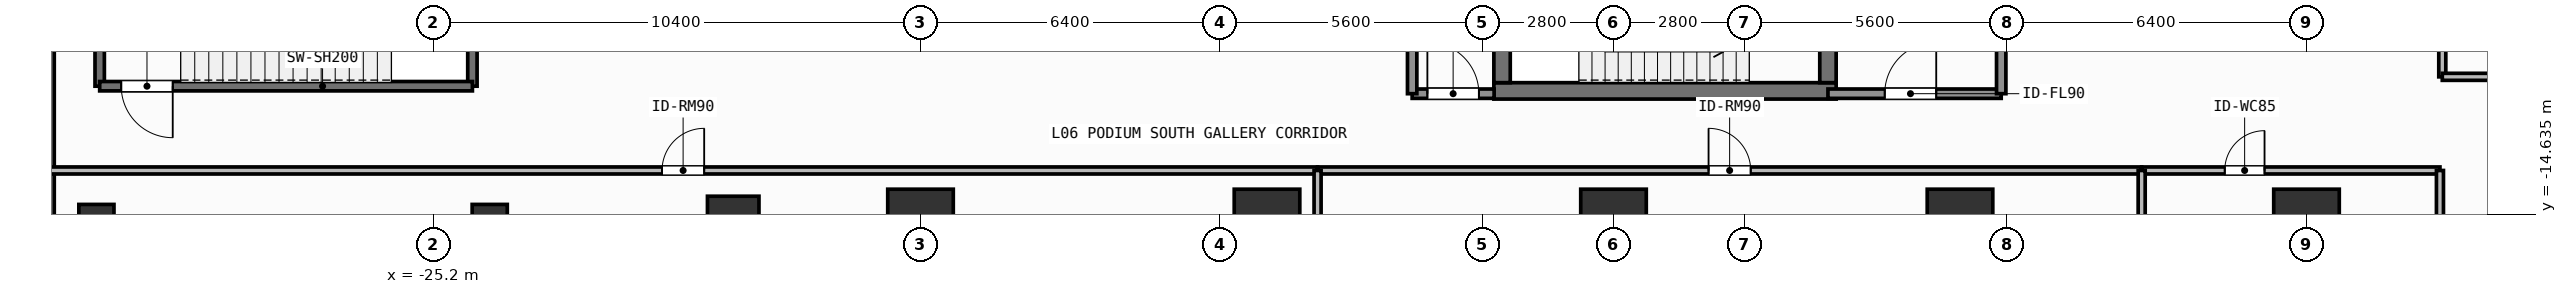
"""IFC4 building model, lengths in metres.
Left out: names, types, materials, properties, quantities, classifications, styles, units other than length and angle.
Written with IfcOpenShell. Run it as: python <this file> out.ifc"""

import sys

from ifc_helpers import new_model, si_unit, direction, frame, frame_2d, origin, origin_2d, place, context, subcontext, project, spatial, rectangle, extrude, element, fill, save


model = new_model("IFC4")
c1 = context("Model", 3, precision=1e-05, world=origin(), true_north=direction((0.0, 1.0)))
c2 = subcontext(c1, "Body", "Model", "MODEL_VIEW")
j1 = project(units=[si_unit("LENGTHUNIT", "METRE"), si_unit("PLANEANGLEUNIT", "RADIAN")], contexts=[c1])
p1 = place(None, origin())
s1 = spatial("IfcSite", under=j1, at=p1, CompositionType="ELEMENT")
p2 = place(p1, origin())
s2 = spatial("IfcBuilding", under=s1, at=p2, CompositionType="ELEMENT")
p3 = place(p2, frame((0.0, 0.0, 21.6)))
s3 = spatial("IfcBuildingStorey", under=s2, at=p3, CompositionType="ELEMENT", Elevation=21.6)
p4 = place(p3, frame((-2.555, -12.0, 0.0), z_axis=(0.0, 0.0, 1.0), x_axis=(1.0, 0.0, 0.0)))
e1 = element("IfcWall", 1, at=p4, inside=s3, PredefinedType="SHEAR", context=c2, shape_type="SweptSolid", body=[
    extrude(rectangle(XDim=7.31, YDim=0.35, at=frame_2d((3.655, 0.0))), origin(), (0.0, 0.0, 1.0), 4.8),
])
p5 = place(p3, frame((-2.38, -11.825, 0.0), z_axis=(0.0, 0.0, 1.0), x_axis=(0.0, 1.0, 0.0)))
e2 = element("IfcWall", 2, at=p5, inside=s3, PredefinedType="SHEAR", context=c2, shape_type="SweptSolid", body=[
    extrude(rectangle(XDim=2.925, YDim=0.35, at=frame_2d((1.462, 0.0))), origin(), (0.0, 0.0, 1.0), 4.8),
])
p6 = place(p3, frame((4.58, -8.9, 0.0), z_axis=(0.0, 0.0, 1.0), x_axis=(0.0, -1.0, 0.0)))
e3 = element("IfcWall", 3, at=p6, inside=s3, PredefinedType="SHEAR", context=c2, shape_type="SweptSolid", body=[
    extrude(rectangle(XDim=2.925, YDim=0.35, at=frame_2d((1.462, 0.0))), origin(), (0.0, 0.0, 1.0), 4.8),
])
p7 = place(p6, frame((0.913, 0.0, 0.0)))
e4 = element("IfcOpeningElement", 4, at=p7, cuts=e3, PredefinedType="OPENING", context=c2, shape_type="SweptSolid", body=[
    extrude(rectangle(XDim=1.1, YDim=2.15, at=frame_2d((0.55, 1.075))), frame((0.0, 0.185, 0.0), z_axis=(0.0, -1.0, 0.0), x_axis=(1.0, 0.0, 0.0)), (0.0, 0.0, 1.0), 0.37),
])
for number, where, z_axis, x_axis in (
    (5, (-14.8, -14.8, 0.0), (0.0, 0.0, 1.0), (1.0, 0.0, 0.0)),
    (6, (-7.4, -14.8, 0.0), (0.0, 0.0, 1.0), (1.0, 0.0, 0.0)),
    (7, (0.0, -14.8, 0.0), (0.0, 0.0, 1.0), (1.0, 0.0, 0.0)),
    (8, (7.4, -14.8, 0.0), (0.0, 0.0, 1.0), (1.0, 0.0, 0.0)),
    (9, (14.8, -14.8, 0.0), (0.0, 0.0, 1.0), (1.0, 0.0, 0.0)),
):
    element("IfcColumn", number, at=place(p3, frame(where, z_axis=z_axis, x_axis=x_axis)), inside=s3, PredefinedType="COLUMN", context=c2, shape_type="SweptSolid", body=[
        extrude(rectangle(XDim=1.4, YDim=1.4, at=origin_2d()), origin(), (0.0, 0.0, 1.0), 4.8),
    ])
p8 = place(p3, frame((-18.8, -14.8, 0.0), z_axis=(0.0, 0.0, 1.0), x_axis=(1.0, 0.0, 0.0)))
e10 = element("IfcColumn", 10, at=p8, inside=s3, PredefinedType="COLUMN", context=c2, shape_type="SweptSolid", body=[
    extrude(rectangle(XDim=1.1, YDim=1.1, at=origin_2d()), origin(), (0.0, 0.0, 1.0), 4.8),
])
for number, where, z_axis, x_axis in (
    (11, (-32.4, -14.8, 0.0), (0.0, 0.0, 1.0), (1.0, 0.0, 0.0)),
    (12, (-24.0, -14.8, 0.0), (0.0, 0.0, 1.0), (1.0, 0.0, 0.0)),
):
    element("IfcColumn", number, at=place(p3, frame(where, z_axis=z_axis, x_axis=x_axis)), inside=s3, PredefinedType="COLUMN", context=c2, shape_type="SweptSolid", body=[
        extrude(rectangle(XDim=0.75, YDim=0.75, at=origin_2d()), origin(), (0.0, 0.0, 1.0), 4.8),
    ])
p9 = place(p3, frame((-33.45, -20.5, 0.0), z_axis=(0.0, 0.0, 1.0), x_axis=(0.0, 1.0, 0.0)))
e13 = element("IfcWall", 13, at=p9, inside=s3, PredefinedType="SOLIDWALL", context=c2, shape_type="SweptSolid", body=[
    extrude(rectangle(XDim=14.09, YDim=0.3, at=frame_2d((7.045, 0.0))), origin(), (0.0, 0.0, 1.0), 4.48),
])
for number, where, z_axis, x_axis in (
    (14, (-32.33, -11.9, 0.0), (0.0, 0.0, 1.0), (0.0, 1.0, 0.0)),
    (15, (-24.37, -8.48, 0.0), (0.0, 0.0, 1.0), (0.0, -1.0, 0.0)),
):
    element("IfcWall", number, at=place(p3, frame(where, z_axis=z_axis, x_axis=x_axis)), inside=s3, PredefinedType="SHEAR", context=c2, shape_type="SweptSolid", body=[
        extrude(rectangle(XDim=3.42, YDim=0.2, at=frame_2d((1.71, 0.0))), origin(), (0.0, 0.0, 1.0), 4.48),
    ])
p10 = place(p3, frame((-24.37, -11.9, 0.0), z_axis=(0.0, 0.0, 1.0), x_axis=(-1.0, 0.0, 0.0)))
e16 = element("IfcWall", 16, at=p10, inside=s3, PredefinedType="SHEAR", context=c2, shape_type="SweptSolid", body=[
    extrude(rectangle(XDim=7.96, YDim=0.2, at=frame_2d((3.98, 0.0))), origin(), (0.0, 0.0, 1.0), 4.48),
])
p11 = place(p10, frame((6.4, 0.0, 0.0)))
e17 = element("IfcOpeningElement", 17, at=p11, cuts=e16, PredefinedType="OPENING", context=c2, shape_type="SweptSolid", body=[
    extrude(rectangle(XDim=1.1, YDim=2.15, at=frame_2d((0.55, 1.075))), frame((0.0, 0.11, 0.0), z_axis=(0.0, -1.0, 0.0), x_axis=(1.0, 0.0, 0.0)), (0.0, 0.0, 1.0), 0.22),
])
p12 = place(p3, frame((4.58, -12.06, 0.0), z_axis=(0.0, 0.0, 1.0), x_axis=(1.0, 0.0, 0.0)))
e18 = element("IfcWall", 18, at=p12, inside=s3, PredefinedType="SOLIDWALL", context=c2, shape_type="SweptSolid", body=[
    extrude(rectangle(XDim=3.7, YDim=0.2, at=frame_2d((1.85, 0.0))), origin(), (0.0, 0.0, 1.0), 4.48),
])
p13 = place(p12, frame((1.212, 0.0, 0.0)))
e19 = element("IfcOpeningElement", 19, at=p13, cuts=e18, PredefinedType="OPENING", context=c2, shape_type="SweptSolid", body=[
    extrude(rectangle(XDim=1.1, YDim=2.15, at=frame_2d((0.55, 1.075))), frame((0.0, 0.11, 0.0), z_axis=(0.0, -1.0, 0.0), x_axis=(1.0, 0.0, 0.0)), (0.0, 0.0, 1.0), 0.22),
])
p14 = place(p3, frame((-4.3, -12.06, 0.0), z_axis=(0.0, 0.0, 1.0), x_axis=(1.0, 0.0, 0.0)))
e20 = element("IfcWall", 20, at=p14, inside=s3, PredefinedType="SOLIDWALL", context=c2, shape_type="SweptSolid", body=[
    extrude(rectangle(XDim=1.75, YDim=0.2, at=frame_2d((0.875, 0.0))), origin(), (0.0, 0.0, 1.0), 4.48),
])
p15 = place(p14, frame((0.325, 0.0, 0.0)))
e21 = element("IfcOpeningElement", 21, at=p15, cuts=e20, PredefinedType="OPENING", context=c2, shape_type="SweptSolid", body=[
    extrude(rectangle(XDim=1.1, YDim=2.15, at=frame_2d((0.55, 1.075))), frame((0.0, 0.11, 0.0), z_axis=(0.0, -1.0, 0.0), x_axis=(1.0, 0.0, 0.0)), (0.0, 0.0, 1.0), 0.22),
])
p16 = place(p3, frame((17.7, -11.7, 0.0), z_axis=(0.0, 0.0, 1.0), x_axis=(0.0, 1.0, 0.0)))
e22 = element("IfcWall", 22, at=p16, inside=s3, PredefinedType="PARTITIONING", context=c2, shape_type="SweptSolid", body=[
    extrude(rectangle(XDim=19.62, YDim=0.15, at=frame_2d((9.81, 0.0))), origin(), (0.0, 0.0, 1.0), 4.48),
])
p17 = place(p16, frame((8.921, 0.0, 0.0)))
e23 = element("IfcOpeningElement", 23, at=p17, cuts=e22, PredefinedType="OPENING", context=c2, shape_type="SweptSolid", body=[
    extrude(rectangle(XDim=1.6, YDim=2.3, at=frame_2d((0.8, 1.15))), frame((0.0, 0.085, 0.0), z_axis=(0.0, -1.0, 0.0), x_axis=(1.0, 0.0, 0.0)), (0.0, 0.0, 1.0), 0.17),
])
p18 = place(p3, frame((-33.42, -13.7, 0.0), z_axis=(0.0, 0.0, 1.0), x_axis=(1.0, 0.0, 0.0)))
e24 = element("IfcWall", 24, at=p18, inside=s3, PredefinedType="PARTITIONING", context=c2, shape_type="SweptSolid", body=[
    extrude(rectangle(XDim=27.1, YDim=0.15, at=frame_2d((13.55, 0.0))), origin(), (0.0, 0.0, 1.0), 4.48),
])
p19 = place(p18, frame((13.1, 0.0, 0.0)))
e25 = element("IfcOpeningElement", 25, at=p19, cuts=e24, PredefinedType="OPENING", context=c2, shape_type="SweptSolid", body=[
    extrude(rectangle(XDim=0.9, YDim=2.1, at=frame_2d((0.45, 1.05))), frame((0.0, 0.085, 0.0), z_axis=(0.0, -1.0, 0.0), x_axis=(1.0, 0.0, 0.0)), (0.0, 0.0, 1.0), 0.17),
])
p20 = place(p3, frame((-6.32, -13.7, 0.0), z_axis=(0.0, 0.0, 1.0), x_axis=(1.0, 0.0, 0.0)))
e26 = element("IfcWall", 26, at=p20, inside=s3, PredefinedType="PARTITIONING", context=c2, shape_type="SweptSolid", body=[
    extrude(rectangle(XDim=17.6, YDim=0.15, at=frame_2d((8.8, 0.0))), origin(), (0.0, 0.0, 1.0), 4.48),
])
p21 = place(p20, frame((8.35, 0.0, 0.0)))
e27 = element("IfcOpeningElement", 27, at=p21, cuts=e26, PredefinedType="OPENING", context=c2, shape_type="SweptSolid", body=[
    extrude(rectangle(XDim=0.9, YDim=2.1, at=frame_2d((0.45, 1.05))), frame((0.0, 0.085, 0.0), z_axis=(0.0, -1.0, 0.0), x_axis=(1.0, 0.0, 0.0)), (0.0, 0.0, 1.0), 0.17),
])
p22 = place(p3, frame((11.28, -13.7, 0.0), z_axis=(0.0, 0.0, 1.0), x_axis=(1.0, 0.0, 0.0)))
e28 = element("IfcWall", 28, at=p22, inside=s3, PredefinedType="PARTITIONING", context=c2, shape_type="SweptSolid", body=[
    extrude(rectangle(XDim=6.37, YDim=0.15, at=frame_2d((3.185, 0.0))), origin(), (0.0, 0.0, 1.0), 4.48),
])
p23 = place(p22, frame((1.774, 0.0, 0.0)))
e29 = element("IfcOpeningElement", 29, at=p23, cuts=e28, PredefinedType="OPENING", context=c2, shape_type="SweptSolid", body=[
    extrude(rectangle(XDim=0.85, YDim=2.1, at=frame_2d((0.425, 1.05))), frame((0.0, 0.085, 0.0), z_axis=(0.0, -1.0, 0.0), x_axis=(1.0, 0.0, 0.0)), (0.0, 0.0, 1.0), 0.17),
])
for number, where, z_axis, x_axis in (
    (30, (8.28, -12.06, 0.0), (0.0, 0.0, 1.0), (0.0, 1.0, 0.0)),
    (31, (-4.3, -12.06, 0.0), (0.0, 0.0, 1.0), (0.0, 1.0, 0.0)),
):
    element("IfcWall", number, at=place(p3, frame(where, z_axis=z_axis, x_axis=x_axis)), inside=s3, PredefinedType="SOLIDWALL", context=c2, shape_type="SweptSolid", body=[
        extrude(rectangle(XDim=3.11, YDim=0.2, at=frame_2d((1.555, 0.0))), origin(), (0.0, 0.0, 1.0), 4.48),
    ])
p24 = place(p3, frame((17.7, -11.7, 0.0), z_axis=(0.0, 0.0, 1.0), x_axis=(1.0, 0.0, 0.0)))
e32 = element("IfcWall", 32, at=p24, inside=s3, PredefinedType="PARTITIONING", context=c2, shape_type="SweptSolid", body=[
    extrude(rectangle(XDim=15.72, YDim=0.15, at=frame_2d((7.86, 0.0))), origin(), (0.0, 0.0, 1.0), 4.48),
])
p25 = place(p3, frame((-6.32, -24.92, 0.0), z_axis=(0.0, 0.0, 1.0), x_axis=(0.0, 1.0, 0.0)))
e33 = element("IfcWall", 33, at=p25, inside=s3, PredefinedType="PARTITIONING", context=c2, shape_type="SweptSolid", body=[
    extrude(rectangle(XDim=11.22, YDim=0.15, at=frame_2d((5.61, 0.0))), origin(), (0.0, 0.0, 1.0), 4.48),
])
p26 = place(p3, frame((11.28, -24.92, 0.0), z_axis=(0.0, 0.0, 1.0), x_axis=(0.0, 1.0, 0.0)))
e34 = element("IfcWall", 34, at=p26, inside=s3, PredefinedType="PARTITIONING", context=c2, shape_type="SweptSolid", body=[
    extrude(rectangle(XDim=11.22, YDim=0.15, at=frame_2d((5.61, 0.0))), origin(), (0.0, 0.0, 1.0), 4.17),
])
p27 = place(p3, frame((17.65, -24.92, 0.0), z_axis=(0.0, 0.0, 1.0), x_axis=(0.0, 1.0, 0.0)))
e35 = element("IfcWall", 35, at=p27, inside=s3, PredefinedType="PARTITIONING", context=c2, shape_type="SweptSolid", body=[
    extrude(rectangle(XDim=11.22, YDim=0.15, at=frame_2d((5.61, 0.0))), origin(), (0.0, 0.0, 1.0), 4.48),
])
p28 = place(p11, origin())
e36 = element("IfcDoor", 36, at=p28, inside=s3, OperationType="SINGLE_SWING_LEFT", PredefinedType="DOOR", context=c2, shape_type="SweptSolid", body=[
    extrude(rectangle(XDim=1.1, YDim=2.15, at=frame_2d((0.55, 1.075))), frame((0.0, 0.025, 0.0), z_axis=(0.0, -1.0, 0.0), x_axis=(1.0, 0.0, 0.0)), (0.0, 0.0, 1.0), 0.05),
])
fill(e17, e36)
p29 = place(p13, origin())
e37 = element("IfcDoor", 37, at=p29, inside=s3, OperationType="SINGLE_SWING_RIGHT", PredefinedType="DOOR", context=c2, shape_type="SweptSolid", body=[
    extrude(rectangle(XDim=1.1, YDim=2.15, at=frame_2d((0.55, 1.075))), frame((0.0, 0.025, 0.0), z_axis=(0.0, -1.0, 0.0), x_axis=(1.0, 0.0, 0.0)), (0.0, 0.0, 1.0), 0.05),
])
fill(e19, e37)
p30 = place(p15, origin())
e38 = element("IfcDoor", 38, at=p30, inside=s3, OperationType="SINGLE_SWING_LEFT", PredefinedType="DOOR", context=c2, shape_type="SweptSolid", body=[
    extrude(rectangle(XDim=1.1, YDim=2.15, at=frame_2d((0.55, 1.075))), frame((0.0, 0.025, 0.0), z_axis=(0.0, -1.0, 0.0), x_axis=(1.0, 0.0, 0.0)), (0.0, 0.0, 1.0), 0.05),
])
fill(e21, e38)
p31 = place(p19, origin())
e39 = element("IfcDoor", 39, at=p31, inside=s3, OperationType="SINGLE_SWING_RIGHT", PredefinedType="DOOR", context=c2, shape_type="SweptSolid", body=[
    extrude(rectangle(XDim=0.9, YDim=2.1, at=frame_2d((0.45, 1.05))), frame((0.0, 0.025, 0.0), z_axis=(0.0, -1.0, 0.0), x_axis=(1.0, 0.0, 0.0)), (0.0, 0.0, 1.0), 0.05),
])
fill(e25, e39)
p32 = place(p21, origin())
e40 = element("IfcDoor", 40, at=p32, inside=s3, OperationType="SINGLE_SWING_LEFT", PredefinedType="DOOR", context=c2, shape_type="SweptSolid", body=[
    extrude(rectangle(XDim=0.9, YDim=2.1, at=frame_2d((0.45, 1.05))), frame((0.0, 0.025, 0.0), z_axis=(0.0, -1.0, 0.0), x_axis=(1.0, 0.0, 0.0)), (0.0, 0.0, 1.0), 0.05),
])
fill(e27, e40)
p33 = place(p23, origin())
e41 = element("IfcDoor", 41, at=p33, inside=s3, OperationType="SINGLE_SWING_RIGHT", PredefinedType="DOOR", context=c2, shape_type="SweptSolid", body=[
    extrude(rectangle(XDim=0.85, YDim=2.1, at=frame_2d((0.425, 1.05))), frame((0.0, 0.025, 0.0), z_axis=(0.0, -1.0, 0.0), x_axis=(1.0, 0.0, 0.0)), (0.0, 0.0, 1.0), 0.05),
])
fill(e29, e41)
save(model, sys.argv[1])
